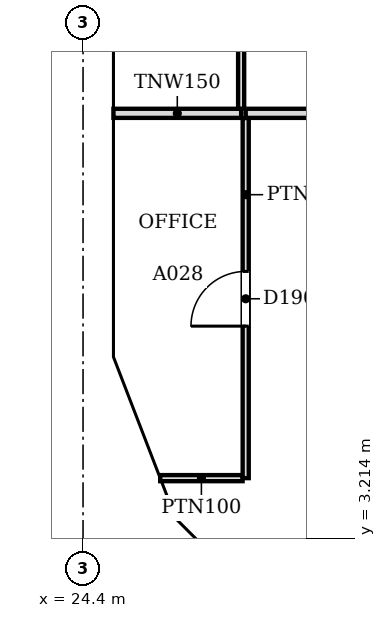
"""IFC4 building model, lengths in metres.
Left out: names, types, materials, properties, quantities, classifications, styles, units other than length and angle.
Written with IfcOpenShell. Run it as: python <this file> out.ifc"""

import sys

from ifc_helpers import new_model, si_unit, direction, frame, frame_2d, origin, place, context, subcontext, project, spatial, polyline, rectangle, outline, extrude, faceted_brep, source, transform, mapped, element, fill, save


model = new_model("IFC4")
c1 = context("Model", 3, precision=1e-05, world=origin(), true_north=direction((0.0, 1.0)))
c2 = subcontext(c1, "Body", "Model", "MODEL_VIEW")
j1 = project(units=[si_unit("LENGTHUNIT", "METRE"), si_unit("PLANEANGLEUNIT", "RADIAN")], contexts=[c1])
p1 = place(None, origin())
s1 = spatial("IfcSite", under=j1, at=p1, CompositionType="ELEMENT")
p2 = place(p1, origin())
s2 = spatial("IfcBuilding", under=s1, at=p2, CompositionType="ELEMENT")
p3 = place(p2, frame((0.0, 0.0, 139.2)))
s3 = spatial("IfcBuildingStorey", under=s2, at=p3, CompositionType="ELEMENT", Elevation=139.2)
m1 = source(origin(), c2, "Body", "Brep", [
    faceted_brep([(0.093, -0.25, 0.057), (3.143, -0.25, 3.8), (0.093, -0.25, 7.543), (0.0, 0.25, 7.544), (0.047, 0.25, 7.6), (3.143, 0.25, 3.8), (0.047, 0.25, 0.0), (0.0, 0.25, 0.056), (0.047, 0.0, 0.0), (0.047, 0.0, 7.6)], [[[0, 1, 2]], [[3, 4, 5, 6, 7]], [[6, 5, 1, 0, 8]], [[5, 4, 9, 2, 1]], [[4, 3, 9]], [[7, 6, 8]], [[7, 8, 0, 2, 9, 3]]]),
])
p4 = place(p3, frame((24.65, 12.293, -3.8), z_axis=(0.0, 0.0, 1.0), x_axis=(0.0, -1.0, 0.0)))
e1 = element("IfcWall", 1, at=p4, inside=s3, PredefinedType="SOLIDWALL", context=c2, shape_type="MappedRepresentation", body=[
    mapped(m1, transform((0.0, 0.0, 0.0), scale=1.0)),
])
m2 = source(origin(), c2, "Body", "SweptSolid", [
    extrude(outline(polyline([(0.247, 0.641), (2.821, 3.8), (0.247, 6.959), (0.247, 0.641)])), frame((0.0, 0.26, 0.0), z_axis=(0.0, -1.0, 0.0), x_axis=(1.0, 0.0, 0.0)), (0.0, 0.0, 1.0), 0.52),
])
p5 = place(p4, origin())
e2 = element("IfcOpeningElement", 2, at=p5, cuts=e1, PredefinedType="OPENING", context=c2, shape_type="MappedRepresentation", body=[
    mapped(m2, transform((0.0, 0.0, 0.0), scale=1.0)),
])
m3 = source(origin(), c2, "Body", "Brep", [
    faceted_brep([(3.003, -0.25, 0.0), (3.05, -0.25, 0.06), (3.05, -0.25, 7.54), (3.003, -0.25, 7.6), (0.0, -0.25, 3.8), (0.0, 0.25, 3.8), (2.957, 0.25, 7.541), (2.957, 0.25, 0.059), (3.003, 0.0, 0.0), (3.003, 0.0, 7.6)], [[[0, 1, 2, 3, 4]], [[5, 6, 7]], [[1, 0, 8]], [[9, 3, 2]], [[6, 5, 4, 3, 9]], [[5, 7, 8, 0, 4]], [[1, 8, 7, 6, 9, 2]]]),
])
p6 = place(p3, frame((24.65, 9.15, -3.8), z_axis=(0.0, 0.0, 1.0), x_axis=(0.0, -1.0, 0.0)))
e3 = element("IfcWall", 3, at=p6, inside=s3, PredefinedType="SOLIDWALL", context=c2, shape_type="MappedRepresentation", body=[
    mapped(m3, transform((0.0, 0.0, 0.0), scale=1.0)),
])
m4 = source(origin(), c2, "Body", "SweptSolid", [
    extrude(outline(polyline([(2.803, 6.944), (0.319, 3.8), (2.803, 0.656), (2.803, 6.944)])), frame((0.0, 0.26, 0.0), z_axis=(0.0, -1.0, 0.0), x_axis=(1.0, 0.0, 0.0)), (0.0, 0.0, 1.0), 0.52),
])
p7 = place(p6, origin())
e4 = element("IfcOpeningElement", 4, at=p7, cuts=e3, PredefinedType="OPENING", context=c2, shape_type="MappedRepresentation", body=[
    mapped(m4, transform((0.0, 0.0, 0.0), scale=1.0)),
])
m5 = source(origin(), c2, "Body", "Brep", [
    faceted_brep([(0.047, -0.25, 0.0), (2.997, -0.25, 3.8), (0.047, -0.25, 7.6), (0.0, -0.25, 7.541), (0.0, -0.25, 0.059), (0.093, 0.25, 7.54), (2.944, 0.25, 3.868), (2.944, 0.25, 3.732), (0.093, 0.25, 0.06), (2.997, 0.0, 3.8), (0.047, 0.0, 0.0), (0.047, 0.0, 7.6)], [[[0, 1, 2, 3, 4]], [[5, 6, 7, 8]], [[8, 7, 9, 1, 0, 10]], [[6, 5, 11, 2, 1, 9]], [[3, 2, 11]], [[10, 0, 4]], [[8, 10, 4, 3, 11, 5]], [[9, 7, 6]]]),
])
p8 = place(p3, frame((24.633, 6.19, -3.8), z_axis=(0.0, 0.0, 1.0), x_axis=(0.359901446078, -0.932990326376, 0.0)))
e5 = element("IfcWall", 5, at=p8, inside=s3, PredefinedType="SOLIDWALL", context=c2, shape_type="MappedRepresentation", body=[
    mapped(m5, transform((0.0, 0.0, 0.0), scale=1.0)),
])
m6 = source(origin(), c2, "Body", "SweptSolid", [
    extrude(outline(polyline([(0.247, 0.665), (2.681, 3.8), (0.247, 6.935), (0.247, 0.665)])), frame((0.0, 0.26, 0.0), z_axis=(0.0, -1.0, 0.0), x_axis=(1.0, 0.0, 0.0)), (0.0, 0.0, 1.0), 0.52),
])
p9 = place(p8, origin())
e6 = element("IfcOpeningElement", 6, at=p9, cuts=e5, PredefinedType="OPENING", context=c2, shape_type="MappedRepresentation", body=[
    mapped(m6, transform((0.0, 0.0, 0.0), scale=1.0)),
])
m7 = source(origin(), c2, "Body", "Brep", [
    faceted_brep([(2.944, -0.25, 0.0), (2.997, -0.25, 0.068), (2.997, -0.25, 7.532), (2.944, -0.25, 7.6), (0.0, -0.25, 3.8), (0.053, 0.25, 3.868), (2.891, 0.25, 7.532), (2.891, 0.25, 0.068), (0.053, 0.25, 3.732), (2.944, 0.0, 0.0), (2.944, 0.0, 7.6), (0.0, 0.0, 3.8)], [[[0, 1, 2, 3, 4]], [[5, 6, 7, 8]], [[1, 0, 9]], [[10, 3, 2]], [[6, 5, 11, 4, 3, 10]], [[8, 7, 9, 0, 4, 11]], [[8, 11, 5]], [[1, 9, 7, 6, 10, 2]]]),
])
p10 = place(p3, frame((25.712, 3.394, -3.8), z_axis=(0.0, 0.0, 1.0), x_axis=(0.707066050402, -0.707147509625, 0.0)))
e7 = element("IfcWall", 7, at=p10, inside=s3, PredefinedType="SOLIDWALL", context=c2, shape_type="MappedRepresentation", body=[
    mapped(m7, transform((0.0, 0.0, 0.0), scale=1.0)),
])
m8 = source(origin(), c2, "Body", "SweptSolid", [
    extrude(outline(polyline([(2.744, 6.934), (0.316, 3.8), (2.744, 0.667), (2.744, 6.934)])), frame((0.0, 0.26, 0.0), z_axis=(0.0, -1.0, 0.0), x_axis=(1.0, 0.0, 0.0)), (0.0, 0.0, 1.0), 0.52),
])
p11 = place(p10, origin())
e8 = element("IfcOpeningElement", 8, at=p11, cuts=e7, PredefinedType="OPENING", context=c2, shape_type="MappedRepresentation", body=[
    mapped(m8, transform((0.0, 0.0, 0.0), scale=1.0)),
])
p12 = place(p2, frame((0.0, 0.0, 143.0)))
s4 = spatial("IfcBuildingStorey", under=s2, at=p12, CompositionType="ELEMENT", Elevation=143.0)
m9 = source(origin(), c2, "Body", "Brep", [
    faceted_brep([(3.096, -0.25, 0.0), (6.1, -0.25, 3.8), (3.096, -0.25, 7.6), (0.047, -0.25, 3.857), (0.047, -0.25, 3.743), (0.0, 0.25, 3.8), (3.096, 0.25, 7.6), (6.053, 0.25, 3.859), (6.053, 0.25, 3.741), (3.096, 0.25, 0.0), (6.1, -0.0, 3.8), (0.0, 0.0, 3.8)], [[[0, 1, 2, 3, 4]], [[5, 6, 7, 8, 9]], [[9, 8, 10, 1, 0]], [[7, 6, 2, 1, 10]], [[6, 5, 11, 3, 2]], [[5, 9, 0, 4, 11]], [[11, 4, 3]], [[10, 8, 7]]]),
])
p13 = place(p12, frame((24.65, 12.247, -3.8), z_axis=(0.0, 0.0, 1.0), x_axis=(0.0, -1.0, 0.0)))
e9 = element("IfcWall", 9, at=p13, inside=s4, PredefinedType="SOLIDWALL", context=c2, shape_type="MappedRepresentation", body=[
    mapped(m9, transform((0.0, 0.0, 0.0), scale=1.0)),
])
m10 = source(origin(), c2, "Body", "SweptSolid", [
    extrude(outline(polyline([(3.094, 0.399), (5.781, 3.8), (3.094, 7.201), (0.323, 3.8), (3.094, 0.399)])), frame((0.0, 0.26, 0.0), z_axis=(0.0, -1.0, 0.0), x_axis=(1.0, 0.0, 0.0)), (0.0, 0.0, 1.0), 0.52),
])
p14 = place(p13, origin())
e10 = element("IfcOpeningElement", 10, at=p14, cuts=e9, PredefinedType="OPENING", context=c2, shape_type="MappedRepresentation", body=[
    mapped(m10, transform((0.0, 0.0, 0.0), scale=1.0)),
])
m11 = source(origin(), c2, "Body", "Brep", [
    faceted_brep([(2.95, -0.25, 0.0), (3.003, -0.25, 0.068), (3.003, -0.25, 7.532), (2.95, -0.25, 7.6), (0.0, -0.25, 3.8), (0.047, 0.25, 3.86), (2.898, 0.25, 7.532), (2.898, 0.25, 0.068), (0.047, 0.25, 3.74), (2.95, 0.0, 0.0), (2.95, 0.0, 7.6), (0.0, 0.0, 3.8)], [[[0, 1, 2, 3, 4]], [[5, 6, 7, 8]], [[1, 0, 9]], [[10, 3, 2]], [[6, 5, 11, 4, 3, 10]], [[8, 7, 9, 0, 4, 11]], [[8, 11, 5]], [[1, 9, 7, 6, 10, 2]]]),
])
p15 = place(p12, frame((24.65, 6.146, -3.8), z_axis=(0.0, 0.0, 1.0), x_axis=(0.359953949349, -0.932970071518, 0.0)))
e11 = element("IfcWall", 11, at=p15, inside=s4, PredefinedType="SOLIDWALL", context=c2, shape_type="MappedRepresentation", body=[
    mapped(m11, transform((0.0, 0.0, 0.0), scale=1.0)),
])
m12 = source(origin(), c2, "Body", "SweptSolid", [
    extrude(outline(polyline([(2.75, 6.935), (0.316, 3.8), (2.75, 0.665), (2.75, 6.935)])), frame((0.0, 0.26, 0.0), z_axis=(0.0, -1.0, 0.0), x_axis=(1.0, 0.0, 0.0)), (0.0, 0.0, 1.0), 0.52),
])
p16 = place(p15, origin())
e12 = element("IfcOpeningElement", 12, at=p16, cuts=e11, PredefinedType="OPENING", context=c2, shape_type="MappedRepresentation", body=[
    mapped(m12, transform((0.0, 0.0, 0.0), scale=1.0)),
])
m13 = source(origin(), c2, "Body", "Brep", [
    faceted_brep([(0.053, -0.25, 0.0), (2.997, -0.25, 3.8), (0.053, -0.25, 7.6), (0.0, -0.25, 7.532), (0.0, -0.25, 0.068), (0.106, 0.25, 7.532), (2.944, 0.25, 3.868), (2.944, 0.25, 3.732), (0.106, 0.25, 0.068), (2.997, 0.0, 3.8), (0.053, 0.0, 0.0), (0.053, 0.0, 7.6)], [[[0, 1, 2, 3, 4]], [[5, 6, 7, 8]], [[8, 7, 9, 1, 0, 10]], [[6, 5, 11, 2, 1, 9]], [[3, 2, 11]], [[10, 0, 4]], [[8, 10, 4, 3, 11, 5]], [[9, 7, 6]]]),
])
p17 = place(p12, frame((25.675, 3.431, -3.8), z_axis=(0.0, 0.0, 1.0), x_axis=(0.707106781187, -0.707106781187, 0.0)))
e13 = element("IfcWall", 13, at=p17, inside=s4, PredefinedType="SOLIDWALL", context=c2, shape_type="MappedRepresentation", body=[
    mapped(m13, transform((0.0, 0.0, 0.0), scale=1.0)),
])
m14 = source(origin(), c2, "Body", "SweptSolid", [
    extrude(outline(polyline([(0.253, 0.666), (2.681, 3.8), (0.253, 6.934), (0.253, 0.666)])), frame((0.0, 0.26, 0.0), z_axis=(0.0, -1.0, 0.0), x_axis=(1.0, 0.0, 0.0)), (0.0, 0.0, 1.0), 0.52),
])
p18 = place(p17, origin())
e14 = element("IfcOpeningElement", 14, at=p18, cuts=e13, PredefinedType="OPENING", context=c2, shape_type="MappedRepresentation", body=[
    mapped(m14, transform((0.0, 0.0, 0.0), scale=1.0)),
])
p19 = place(p3, frame((25.669, 4.2, 0.0), z_axis=(0.0, 0.0, 1.0), x_axis=(1.0, 0.0, 0.0)))
e15 = element("IfcWall", 15, at=p19, inside=s3, PredefinedType="PARTITIONING", context=c2, shape_type="SweptSolid", body=[
    extrude(rectangle(XDim=1.355, YDim=0.1, at=frame_2d((0.678, 0.0))), origin(), (0.0, 0.0, 1.0), 3.067),
])
p20 = place(p3, frame((27.075, 4.2, 0.0), z_axis=(0.0, 0.0, 1.0), x_axis=(0.0, 1.0, 0.0)))
e16 = element("IfcWall", 16, at=p20, inside=s3, PredefinedType="PARTITIONING", context=c2, shape_type="SweptSolid", body=[
    extrude(rectangle(XDim=5.924, YDim=0.1, at=frame_2d((2.962, 0.0))), origin(), (0.0, 0.0, 1.0), 3.067),
])
m15 = source(origin(), c2, "Body", "SweptSolid", [
    extrude(rectangle(XDim=0.9, YDim=2.1, at=frame_2d((0.45, 1.05))), frame((0.0, 0.06, 0.0), z_axis=(0.0, -1.0, 0.0), x_axis=(1.0, 0.0, 0.0)), (0.0, 0.0, 1.0), 0.12),
])
p21 = place(p20, frame((2.5, 0.0, 0.0)))
e17 = element("IfcOpeningElement", 17, at=p21, cuts=e16, PredefinedType="OPENING", context=c2, shape_type="MappedRepresentation", body=[
    mapped(m15, transform((0.0, 0.0, 0.0), scale=1.0)),
])
p22 = place(p3, frame((24.9, 10.2, 0.0), z_axis=(0.0, 0.0, 1.0), x_axis=(1.0, 0.0, 0.0)))
e18 = element("IfcWall", 18, at=p22, inside=s3, PredefinedType="PARTITIONING", context=c2, shape_type="SweptSolid", body=[
    extrude(rectangle(XDim=2.1, YDim=0.15, at=frame_2d((1.05, 0.0))), origin(), (0.0, 0.0, 1.0), 3.067),
])
p23 = place(p3, frame((27.075, 10.2, 0.0), z_axis=(0.0, 0.0, 1.0), x_axis=(1.0, 0.0, 0.0)))
e19 = element("IfcWall", 19, at=p23, inside=s3, PredefinedType="PARTITIONING", context=c2, shape_type="SweptSolid", body=[
    extrude(rectangle(XDim=17.849, YDim=0.15, at=frame_2d((8.925, 0.0))), origin(), (0.0, 0.0, 1.0), 3.067),
])
p24 = place(p3, frame((27.0, 10.276, 0.0), z_axis=(0.0, 0.0, 1.0), x_axis=(0.0, 1.0, 0.0)))
e20 = element("IfcWall", 20, at=p24, inside=s3, PredefinedType="PARTITIONING", context=c2, shape_type="SweptSolid", body=[
    extrude(rectangle(XDim=8.448, YDim=0.1, at=frame_2d((4.224, 0.0))), origin(), (0.0, 0.0, 1.0), 3.067),
])
p25 = place(p24, frame((1.6, 0.0, 0.0)))
e21 = element("IfcOpeningElement", 21, at=p25, cuts=e20, PredefinedType="OPENING", context=c2, shape_type="MappedRepresentation", body=[
    mapped(m15, transform((0.0, 0.0, 0.0), scale=1.0)),
])
p26 = place(p24, frame((5.779, 0.0, 0.0)))
e22 = element("IfcOpeningElement", 22, at=p26, cuts=e20, PredefinedType="OPENING", context=c2, shape_type="MappedRepresentation", body=[
    mapped(m15, transform((0.0, 0.0, 0.0), scale=1.0)),
])
m16 = source(origin(), c2, "Body", "SweptSolid", [
    extrude(rectangle(XDim=0.9, YDim=2.1, at=frame_2d((0.45, 1.05))), frame((0.0, 0.025, 0.0), z_axis=(0.0, -1.0, 0.0), x_axis=(1.0, 0.0, 0.0)), (0.0, 0.0, 1.0), 0.05),
])
p27 = place(p21, origin())
e23 = element("IfcDoor", 23, at=p27, inside=s3, OperationType="SINGLE_SWING_LEFT", PredefinedType="DOOR", context=c2, shape_type="MappedRepresentation", body=[
    mapped(m16, transform((0.0, 0.0, 0.0), scale=1.0)),
])
fill(e17, e23)
save(model, sys.argv[1])
